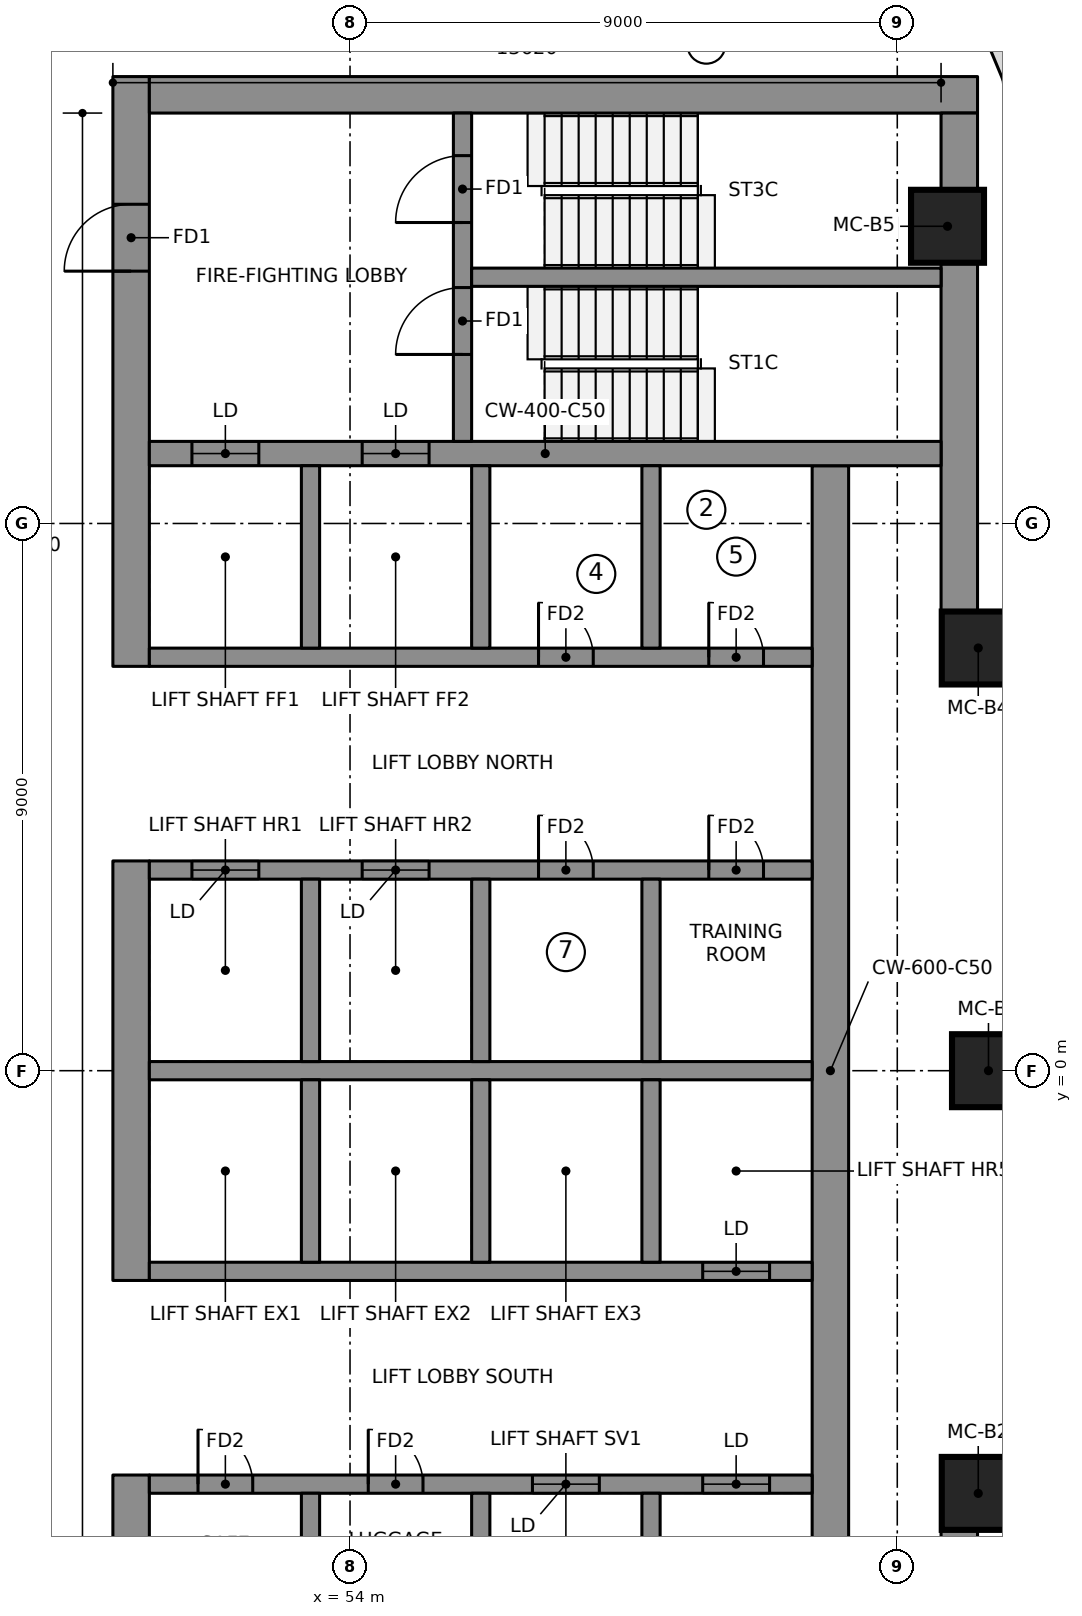
"""IFC4 building model, lengths in metres.
Left out: names, types, materials, properties, quantities, classifications, styles, units other than length and angle.
Written with IfcOpenShell. Run it as: python <this file> out.ifc"""

import sys

from ifc_helpers import new_model, si_unit, direction, frame, frame_2d, origin, origin_2d, place, context, subcontext, project, spatial, polyline, rectangle, outline, extrude, element, fill, save


model = new_model("IFC4")
c1 = context("Model", 3, precision=1e-05, world=origin(), true_north=direction((0.0, 1.0)))
c2 = subcontext(c1, "Body", "Model", "MODEL_VIEW")
j1 = project(units=[si_unit("LENGTHUNIT", "METRE"), si_unit("PLANEANGLEUNIT", "RADIAN")], contexts=[c1])
p1 = place(None, origin())
s1 = spatial("IfcSite", under=j1, at=p1, CompositionType="ELEMENT")
p2 = place(p1, origin())
s2 = spatial("IfcBuilding", under=s1, at=p2, CompositionType="ELEMENT")
p3 = place(p2, frame((0.0, 0.0, 227.9)))
s3 = spatial("IfcBuildingStorey", under=s2, at=p3, CompositionType="ELEMENT", Elevation=227.9)
p4 = place(p3, frame((50.4, 6.65, 0.0), z_axis=(0.0, 0.0, 1.0), x_axis=(0.0, 1.0, 0.0)))
e1 = element("IfcWall", 1, at=p4, inside=s3, PredefinedType="SHEAR", context=c2, shape_type="SweptSolid", body=[
    extrude(rectangle(XDim=9.7, YDim=0.6, at=frame_2d((4.85, 0.0))), origin(), (0.0, 0.0, 1.0), 3.55),
])
p5 = place(p4, frame((6.5, 0.0, 0.0)))
e2 = element("IfcOpeningElement", 2, at=p5, cuts=e1, PredefinedType="OPENING", context=c2, shape_type="SweptSolid", body=[
    extrude(rectangle(XDim=1.1, YDim=2.1, at=frame_2d((0.55, 1.05))), frame((0.0, 0.31, 0.0), z_axis=(0.0, -1.0, 0.0), x_axis=(1.0, 0.0, 0.0)), (0.0, 0.0, 1.0), 0.62),
])
p6 = place(p3, frame((50.4, -3.45, 0.0), z_axis=(0.0, 0.0, 1.0), x_axis=(0.0, 1.0, 0.0)))
e3 = element("IfcWall", 3, at=p6, inside=s3, PredefinedType="SHEAR", context=c2, shape_type="SweptSolid", body=[
    extrude(rectangle(XDim=6.9, YDim=0.6, at=frame_2d((3.45, 0.0))), origin(), (0.0, 0.0, 1.0), 3.55),
])
p7 = place(p3, frame((50.4, -16.35, 0.0), z_axis=(0.0, 0.0, 1.0), x_axis=(0.0, 1.0, 0.0)))
e4 = element("IfcWall", 4, at=p7, inside=s3, PredefinedType="SHEAR", context=c2, shape_type="SweptSolid", body=[
    extrude(rectangle(XDim=9.7, YDim=0.6, at=frame_2d((4.85, 0.0))), origin(), (0.0, 0.0, 1.0), 3.55),
])
p8 = place(p7, frame((2.1, 0.0, 0.0)))
e5 = element("IfcOpeningElement", 5, at=p8, cuts=e4, PredefinedType="OPENING", context=c2, shape_type="SweptSolid", body=[
    extrude(rectangle(XDim=1.1, YDim=2.1, at=frame_2d((0.55, 1.05))), frame((0.0, 0.31, 0.0), z_axis=(0.0, -1.0, 0.0), x_axis=(1.0, 0.0, 0.0)), (0.0, 0.0, 1.0), 0.62),
])
p9 = place(p3, frame((50.7, 16.05, 0.0), z_axis=(0.0, 0.0, 1.0), x_axis=(1.0, 0.0, 0.0)))
e6 = element("IfcWall", 6, at=p9, inside=s3, PredefinedType="SHEAR", context=c2, shape_type="SweptSolid", body=[
    extrude(rectangle(XDim=13.62, YDim=0.6, at=frame_2d((6.81, 0.0))), origin(), (0.0, 0.0, 1.0), 3.55),
])
for number, where, z_axis, x_axis in (
    (7, (64.02, 7.502, 0.0), (0.0, 0.0, 1.0), (0.0, 1.0, 0.0)),
    (8, (64.02, -15.75, 0.0), (0.0, 0.0, 1.0), (0.0, 1.0, 0.0)),
):
    element("IfcWall", number, at=place(p3, frame(where, z_axis=z_axis, x_axis=x_axis)), inside=s3, PredefinedType="SHEAR", context=c2, shape_type="SweptSolid", body=[
        extrude(rectangle(XDim=8.248, YDim=0.6, at=frame_2d((4.124, 0.0))), origin(), (0.0, 0.0, 1.0), 3.55),
    ])
p10 = place(p3, frame((61.9, -9.95, 0.0), z_axis=(0.0, 0.0, 1.0), x_axis=(0.0, 1.0, 0.0)))
e9 = element("IfcWall", 9, at=p10, inside=s3, PredefinedType="SHEAR", context=c2, shape_type="SweptSolid", body=[
    extrude(rectangle(XDim=19.9, YDim=0.6, at=frame_2d((9.95, 0.0))), origin(), (0.0, 0.0, 1.0), 3.55),
])
p11 = place(p3, frame((50.7, 10.15, 0.0), z_axis=(0.0, 0.0, 1.0), x_axis=(1.0, 0.0, 0.0)))
e10 = element("IfcWall", 10, at=p11, inside=s3, PredefinedType="SHEAR", context=c2, shape_type="SweptSolid", body=[
    extrude(rectangle(XDim=13.02, YDim=0.4, at=frame_2d((6.51, 0.0))), origin(), (0.0, 0.0, 1.0), 3.55),
])
p12 = place(p11, frame((0.7, 0.0, 0.0)))
e11 = element("IfcOpeningElement", 11, at=p12, cuts=e10, PredefinedType="OPENING", context=c2, shape_type="SweptSolid", body=[
    extrude(rectangle(XDim=1.1, YDim=2.1, at=frame_2d((0.55, 1.05))), frame((0.0, 0.21, 0.0), z_axis=(0.0, -1.0, 0.0), x_axis=(1.0, 0.0, 0.0)), (0.0, 0.0, 1.0), 0.42),
])
p13 = place(p11, frame((3.5, 0.0, 0.0)))
e12 = element("IfcOpeningElement", 12, at=p13, cuts=e10, PredefinedType="OPENING", context=c2, shape_type="SweptSolid", body=[
    extrude(rectangle(XDim=1.1, YDim=2.1, at=frame_2d((0.55, 1.05))), frame((0.0, 0.21, 0.0), z_axis=(0.0, -1.0, 0.0), x_axis=(1.0, 0.0, 0.0)), (0.0, 0.0, 1.0), 0.42),
])
p14 = place(p3, frame((50.7, 0.0, 0.0), z_axis=(0.0, 0.0, 1.0), x_axis=(1.0, 0.0, 0.0)))
e13 = element("IfcWall", 13, at=p14, inside=s3, PredefinedType="SHEAR", context=c2, shape_type="SweptSolid", body=[
    extrude(rectangle(XDim=10.9, YDim=0.3, at=frame_2d((5.45, 0.0))), origin(), (0.0, 0.0, 1.0), 3.55),
])
p15 = place(p3, frame((50.7, 3.3, 0.0), z_axis=(0.0, 0.0, 1.0), x_axis=(1.0, 0.0, 0.0)))
e14 = element("IfcWall", 14, at=p15, inside=s3, PredefinedType="SHEAR", context=c2, shape_type="SweptSolid", body=[
    extrude(rectangle(XDim=10.9, YDim=0.3, at=frame_2d((5.45, 0.0))), origin(), (0.0, 0.0, 1.0), 3.55),
])
p16 = place(p15, frame((0.7, 0.0, 0.0)))
e15 = element("IfcOpeningElement", 15, at=p16, cuts=e14, PredefinedType="OPENING", context=c2, shape_type="SweptSolid", body=[
    extrude(rectangle(XDim=1.1, YDim=2.1, at=frame_2d((0.55, 1.05))), frame((0.0, 0.16, 0.0), z_axis=(0.0, -1.0, 0.0), x_axis=(1.0, 0.0, 0.0)), (0.0, 0.0, 1.0), 0.32),
])
p17 = place(p15, frame((3.5, 0.0, 0.0)))
e16 = element("IfcOpeningElement", 16, at=p17, cuts=e14, PredefinedType="OPENING", context=c2, shape_type="SweptSolid", body=[
    extrude(rectangle(XDim=1.1, YDim=2.1, at=frame_2d((0.55, 1.05))), frame((0.0, 0.16, 0.0), z_axis=(0.0, -1.0, 0.0), x_axis=(1.0, 0.0, 0.0)), (0.0, 0.0, 1.0), 0.32),
])
p18 = place(p15, frame((6.4, 0.0, 0.0)))
e17 = element("IfcOpeningElement", 17, at=p18, cuts=e14, PredefinedType="OPENING", context=c2, shape_type="SweptSolid", body=[
    extrude(rectangle(XDim=0.9, YDim=2.1, at=frame_2d((0.45, 1.05))), frame((0.0, 0.16, 0.0), z_axis=(0.0, -1.0, 0.0), x_axis=(1.0, 0.0, 0.0)), (0.0, 0.0, 1.0), 0.32),
])
p19 = place(p15, frame((9.2, 0.0, 0.0)))
e18 = element("IfcOpeningElement", 18, at=p19, cuts=e14, PredefinedType="OPENING", context=c2, shape_type="SweptSolid", body=[
    extrude(rectangle(XDim=0.9, YDim=2.1, at=frame_2d((0.45, 1.05))), frame((0.0, 0.16, 0.0), z_axis=(0.0, -1.0, 0.0), x_axis=(1.0, 0.0, 0.0)), (0.0, 0.0, 1.0), 0.32),
])
p20 = place(p3, frame((50.7, 6.8, 0.0), z_axis=(0.0, 0.0, 1.0), x_axis=(1.0, 0.0, 0.0)))
e19 = element("IfcWall", 19, at=p20, inside=s3, PredefinedType="SHEAR", context=c2, shape_type="SweptSolid", body=[
    extrude(rectangle(XDim=10.9, YDim=0.3, at=frame_2d((5.45, 0.0))), origin(), (0.0, 0.0, 1.0), 3.55),
])
p21 = place(p20, frame((6.4, 0.0, 0.0)))
e20 = element("IfcOpeningElement", 20, at=p21, cuts=e19, PredefinedType="OPENING", context=c2, shape_type="SweptSolid", body=[
    extrude(rectangle(XDim=0.9, YDim=2.1, at=frame_2d((0.45, 1.05))), frame((0.0, 0.16, 0.0), z_axis=(0.0, -1.0, 0.0), x_axis=(1.0, 0.0, 0.0)), (0.0, 0.0, 1.0), 0.32),
])
p22 = place(p20, frame((9.2, 0.0, 0.0)))
e21 = element("IfcOpeningElement", 21, at=p22, cuts=e19, PredefinedType="OPENING", context=c2, shape_type="SweptSolid", body=[
    extrude(rectangle(XDim=0.9, YDim=2.1, at=frame_2d((0.45, 1.05))), frame((0.0, 0.16, 0.0), z_axis=(0.0, -1.0, 0.0), x_axis=(1.0, 0.0, 0.0)), (0.0, 0.0, 1.0), 0.32),
])
for number, where, z_axis, x_axis in (
    (22, (53.35, 0.15, 0.0), (0.0, 0.0, 1.0), (0.0, 1.0, 0.0)),
    (23, (53.35, 6.95, 0.0), (0.0, 0.0, 1.0), (0.0, 1.0, 0.0)),
    (24, (56.15, 0.15, 0.0), (0.0, 0.0, 1.0), (0.0, 1.0, 0.0)),
    (25, (56.15, 6.95, 0.0), (0.0, 0.0, 1.0), (0.0, 1.0, 0.0)),
    (26, (58.95, 0.15, 0.0), (0.0, 0.0, 1.0), (0.0, 1.0, 0.0)),
    (27, (58.95, 6.95, 0.0), (0.0, 0.0, 1.0), (0.0, 1.0, 0.0)),
):
    element("IfcWall", number, at=place(p3, frame(where, z_axis=z_axis, x_axis=x_axis)), inside=s3, PredefinedType="SHEAR", context=c2, shape_type="SweptSolid", body=[
        extrude(rectangle(XDim=3.0, YDim=0.3, at=frame_2d((1.5, 0.0))), origin(), (0.0, 0.0, 1.0), 3.55),
    ])
p23 = place(p3, frame((50.7, -3.3, 0.0), z_axis=(0.0, 0.0, 1.0), x_axis=(1.0, 0.0, 0.0)))
e28 = element("IfcWall", 28, at=p23, inside=s3, PredefinedType="SHEAR", context=c2, shape_type="SweptSolid", body=[
    extrude(rectangle(XDim=10.9, YDim=0.3, at=frame_2d((5.45, 0.0))), origin(), (0.0, 0.0, 1.0), 3.55),
])
p24 = place(p23, frame((9.1, 0.0, 0.0)))
e29 = element("IfcOpeningElement", 29, at=p24, cuts=e28, PredefinedType="OPENING", context=c2, shape_type="SweptSolid", body=[
    extrude(rectangle(XDim=1.1, YDim=2.1, at=frame_2d((0.55, 1.05))), frame((0.0, 0.16, 0.0), z_axis=(0.0, -1.0, 0.0), x_axis=(1.0, 0.0, 0.0)), (0.0, 0.0, 1.0), 0.32),
])
p25 = place(p3, frame((50.7, -6.8, 0.0), z_axis=(0.0, 0.0, 1.0), x_axis=(1.0, 0.0, 0.0)))
e30 = element("IfcWall", 30, at=p25, inside=s3, PredefinedType="SHEAR", context=c2, shape_type="SweptSolid", body=[
    extrude(rectangle(XDim=10.9, YDim=0.3, at=frame_2d((5.45, 0.0))), origin(), (0.0, 0.0, 1.0), 3.55),
])
p26 = place(p25, frame((6.3, 0.0, 0.0)))
e31 = element("IfcOpeningElement", 31, at=p26, cuts=e30, PredefinedType="OPENING", context=c2, shape_type="SweptSolid", body=[
    extrude(rectangle(XDim=1.1, YDim=2.1, at=frame_2d((0.55, 1.05))), frame((0.0, 0.16, 0.0), z_axis=(0.0, -1.0, 0.0), x_axis=(1.0, 0.0, 0.0)), (0.0, 0.0, 1.0), 0.32),
])
p27 = place(p25, frame((9.1, 0.0, 0.0)))
e32 = element("IfcOpeningElement", 32, at=p27, cuts=e30, PredefinedType="OPENING", context=c2, shape_type="SweptSolid", body=[
    extrude(rectangle(XDim=1.1, YDim=2.1, at=frame_2d((0.55, 1.05))), frame((0.0, 0.16, 0.0), z_axis=(0.0, -1.0, 0.0), x_axis=(1.0, 0.0, 0.0)), (0.0, 0.0, 1.0), 0.32),
])
p28 = place(p25, frame((0.8, 0.0, 0.0)))
e33 = element("IfcOpeningElement", 33, at=p28, cuts=e30, PredefinedType="OPENING", context=c2, shape_type="SweptSolid", body=[
    extrude(rectangle(XDim=0.9, YDim=2.1, at=frame_2d((0.45, 1.05))), frame((0.0, 0.16, 0.0), z_axis=(0.0, -1.0, 0.0), x_axis=(1.0, 0.0, 0.0)), (0.0, 0.0, 1.0), 0.32),
])
p29 = place(p25, frame((3.6, 0.0, 0.0)))
e34 = element("IfcOpeningElement", 34, at=p29, cuts=e30, PredefinedType="OPENING", context=c2, shape_type="SweptSolid", body=[
    extrude(rectangle(XDim=0.9, YDim=2.1, at=frame_2d((0.45, 1.05))), frame((0.0, 0.16, 0.0), z_axis=(0.0, -1.0, 0.0), x_axis=(1.0, 0.0, 0.0)), (0.0, 0.0, 1.0), 0.32),
])
for number, where, z_axis, x_axis in (
    (35, (53.35, -3.15, 0.0), (0.0, 0.0, 1.0), (0.0, 1.0, 0.0)),
    (36, (53.35, -9.95, 0.0), (0.0, 0.0, 1.0), (0.0, 1.0, 0.0)),
    (37, (56.15, -3.15, 0.0), (0.0, 0.0, 1.0), (0.0, 1.0, 0.0)),
    (38, (56.15, -9.95, 0.0), (0.0, 0.0, 1.0), (0.0, 1.0, 0.0)),
    (39, (58.95, -3.15, 0.0), (0.0, 0.0, 1.0), (0.0, 1.0, 0.0)),
    (40, (58.95, -9.95, 0.0), (0.0, 0.0, 1.0), (0.0, 1.0, 0.0)),
):
    element("IfcWall", number, at=place(p3, frame(where, z_axis=z_axis, x_axis=x_axis)), inside=s3, PredefinedType="SHEAR", context=c2, shape_type="SweptSolid", body=[
        extrude(rectangle(XDim=3.0, YDim=0.3, at=frame_2d((1.5, 0.0))), origin(), (0.0, 0.0, 1.0), 3.55),
    ])
p30 = place(p3, frame((55.85, 10.35, 0.0), z_axis=(0.0, 0.0, 1.0), x_axis=(0.0, 1.0, 0.0)))
e41 = element("IfcWall", 41, at=p30, inside=s3, PredefinedType="SHEAR", context=c2, shape_type="SweptSolid", body=[
    extrude(rectangle(XDim=5.4, YDim=0.3, at=frame_2d((2.7, 0.0))), origin(), (0.0, 0.0, 1.0), 3.55),
])
p31 = place(p30, frame((1.43, 0.0, 0.0)))
e42 = element("IfcOpeningElement", 42, at=p31, cuts=e41, PredefinedType="OPENING", context=c2, shape_type="SweptSolid", body=[
    extrude(rectangle(XDim=1.1, YDim=2.1, at=frame_2d((0.55, 1.05))), frame((0.0, 0.16, 0.0), z_axis=(0.0, -1.0, 0.0), x_axis=(1.0, 0.0, 0.0)), (0.0, 0.0, 1.0), 0.32),
])
p32 = place(p30, frame((3.6, 0.0, 0.0)))
e43 = element("IfcOpeningElement", 43, at=p32, cuts=e41, PredefinedType="OPENING", context=c2, shape_type="SweptSolid", body=[
    extrude(rectangle(XDim=1.1, YDim=2.1, at=frame_2d((0.55, 1.05))), frame((0.0, 0.16, 0.0), z_axis=(0.0, -1.0, 0.0), x_axis=(1.0, 0.0, 0.0)), (0.0, 0.0, 1.0), 0.32),
])
p33 = place(p3, frame((56.0, 13.05, 0.0), z_axis=(0.0, 0.0, 1.0), x_axis=(1.0, 0.0, 0.0)))
e44 = element("IfcWall", 44, at=p33, inside=s3, PredefinedType="SHEAR", context=c2, shape_type="SweptSolid", body=[
    extrude(rectangle(XDim=7.72, YDim=0.3, at=frame_2d((3.86, 0.0))), origin(), (0.0, 0.0, 1.0), 3.55),
])
for number, where, z_axis, x_axis in (
    (45, (64.332, -6.952, 0.0), (0.0, 0.0, 1.0), (1.0, 0.0, 0.0)),
    (46, (64.5, 0.0, 0.0), (0.0, 0.0, 1.0), (1.0, 0.0, 0.0)),
    (47, (64.332, 6.952, 0.0), (0.0, 0.0, 1.0), (1.0, 0.0, 0.0)),
    (48, (63.826, 13.888, 0.0), (0.0, 0.0, 1.0), (1.0, 0.0, 0.0)),
):
    element("IfcColumn", number, at=place(p3, frame(where, z_axis=z_axis, x_axis=x_axis)), inside=s3, PredefinedType="COLUMN", context=c2, shape_type="SweptSolid", body=[
        extrude(rectangle(XDim=1.2, YDim=1.2, at=origin_2d()), origin(), (0.0, 0.0, 1.0), 3.55),
    ])
p34 = place(p3, frame((64.938, 16.337, 0.0), z_axis=(0.0, 0.0, 1.0), x_axis=(-0.3844335483, 0.923152667191, 0.0)))
e49 = element("IfcWall", 49, at=p34, inside=s3, PredefinedType="NOTDEFINED", context=c2, shape_type="SweptSolid", body=[
    extrude(outline(polyline([(-0.03, -0.2), (3.871, -0.2), (3.756, 0.2), (0.03, 0.2), (-0.03, -0.2)])), origin(), (0.0, 0.0, 1.0), 3.25),
])
p35 = place(p34, frame((0.807, 0.0, 0.6)))
e50 = element("IfcOpeningElement", 50, at=p35, cuts=e49, PredefinedType="OPENING", context=c2, shape_type="SweptSolid", body=[
    extrude(outline(polyline([(0.0, 1.35), (0.084, 1.771), (0.322, 2.128), (0.679, 2.366), (1.1, 2.45), (1.521, 2.366), (1.878, 2.128), (2.116, 1.771), (2.2, 1.35), (2.2, 1.1), (2.116, 0.679), (1.878, 0.322), (1.521, 0.084), (1.1, 0.0), (0.679, 0.084), (0.322, 0.322), (0.084, 0.679), (0.0, 1.1), (0.0, 1.35)])), frame((0.0, 0.21, 0.0), z_axis=(0.0, -1.0, 0.0), x_axis=(1.0, 0.0, 0.0)), (0.0, 0.0, 1.0), 0.42),
])
p36 = place(p12, origin())
e51 = element("IfcDoor", 51, at=p36, inside=s3, OperationType="DOUBLE_DOOR_SLIDING", PredefinedType="DOOR", context=c2, shape_type="SweptSolid", body=[
    extrude(rectangle(XDim=1.1, YDim=2.1, at=frame_2d((0.55, 1.05))), frame((0.0, 0.025, 0.0), z_axis=(0.0, -1.0, 0.0), x_axis=(1.0, 0.0, 0.0)), (0.0, 0.0, 1.0), 0.05),
])
fill(e11, e51)
p37 = place(p13, origin())
e52 = element("IfcDoor", 52, at=p37, inside=s3, OperationType="DOUBLE_DOOR_SLIDING", PredefinedType="DOOR", context=c2, shape_type="SweptSolid", body=[
    extrude(rectangle(XDim=1.1, YDim=2.1, at=frame_2d((0.55, 1.05))), frame((0.0, 0.025, 0.0), z_axis=(0.0, -1.0, 0.0), x_axis=(1.0, 0.0, 0.0)), (0.0, 0.0, 1.0), 0.05),
])
fill(e12, e52)
p38 = place(p16, origin())
e53 = element("IfcDoor", 53, at=p38, inside=s3, OperationType="DOUBLE_DOOR_SLIDING", PredefinedType="DOOR", context=c2, shape_type="SweptSolid", body=[
    extrude(rectangle(XDim=1.1, YDim=2.1, at=frame_2d((0.55, 1.05))), frame((0.0, 0.025, 0.0), z_axis=(0.0, -1.0, 0.0), x_axis=(1.0, 0.0, 0.0)), (0.0, 0.0, 1.0), 0.05),
])
fill(e15, e53)
p39 = place(p17, origin())
e54 = element("IfcDoor", 54, at=p39, inside=s3, OperationType="DOUBLE_DOOR_SLIDING", PredefinedType="DOOR", context=c2, shape_type="SweptSolid", body=[
    extrude(rectangle(XDim=1.1, YDim=2.1, at=frame_2d((0.55, 1.05))), frame((0.0, 0.025, 0.0), z_axis=(0.0, -1.0, 0.0), x_axis=(1.0, 0.0, 0.0)), (0.0, 0.0, 1.0), 0.05),
])
fill(e16, e54)
p40 = place(p24, origin())
e55 = element("IfcDoor", 55, at=p40, inside=s3, OperationType="DOUBLE_DOOR_SLIDING", PredefinedType="DOOR", context=c2, shape_type="SweptSolid", body=[
    extrude(rectangle(XDim=1.1, YDim=2.1, at=frame_2d((0.55, 1.05))), frame((0.0, 0.025, 0.0), z_axis=(0.0, -1.0, 0.0), x_axis=(1.0, 0.0, 0.0)), (0.0, 0.0, 1.0), 0.05),
])
fill(e29, e55)
p41 = place(p26, origin())
e56 = element("IfcDoor", 56, at=p41, inside=s3, OperationType="DOUBLE_DOOR_SLIDING", PredefinedType="DOOR", context=c2, shape_type="SweptSolid", body=[
    extrude(rectangle(XDim=1.1, YDim=2.1, at=frame_2d((0.55, 1.05))), frame((0.0, 0.025, 0.0), z_axis=(0.0, -1.0, 0.0), x_axis=(1.0, 0.0, 0.0)), (0.0, 0.0, 1.0), 0.05),
])
fill(e31, e56)
p42 = place(p27, origin())
e57 = element("IfcDoor", 57, at=p42, inside=s3, OperationType="DOUBLE_DOOR_SLIDING", PredefinedType="DOOR", context=c2, shape_type="SweptSolid", body=[
    extrude(rectangle(XDim=1.1, YDim=2.1, at=frame_2d((0.55, 1.05))), frame((0.0, 0.025, 0.0), z_axis=(0.0, -1.0, 0.0), x_axis=(1.0, 0.0, 0.0)), (0.0, 0.0, 1.0), 0.05),
])
fill(e32, e57)
p43 = place(p31, origin())
e58 = element("IfcDoor", 58, at=p43, inside=s3, OperationType="SINGLE_SWING_RIGHT", PredefinedType="DOOR", context=c2, shape_type="SweptSolid", body=[
    extrude(rectangle(XDim=1.1, YDim=2.1, at=frame_2d((0.55, 1.05))), frame((0.0, 0.025, 0.0), z_axis=(0.0, -1.0, 0.0), x_axis=(1.0, 0.0, 0.0)), (0.0, 0.0, 1.0), 0.05),
])
fill(e42, e58)
p44 = place(p32, origin())
e59 = element("IfcDoor", 59, at=p44, inside=s3, OperationType="SINGLE_SWING_RIGHT", PredefinedType="DOOR", context=c2, shape_type="SweptSolid", body=[
    extrude(rectangle(XDim=1.1, YDim=2.1, at=frame_2d((0.55, 1.05))), frame((0.0, 0.025, 0.0), z_axis=(0.0, -1.0, 0.0), x_axis=(1.0, 0.0, 0.0)), (0.0, 0.0, 1.0), 0.05),
])
fill(e43, e59)
p45 = place(p5, origin())
e60 = element("IfcDoor", 60, at=p45, inside=s3, OperationType="SINGLE_SWING_RIGHT", PredefinedType="DOOR", context=c2, shape_type="SweptSolid", body=[
    extrude(rectangle(XDim=1.1, YDim=2.1, at=frame_2d((0.55, 1.05))), frame((0.0, 0.025, 0.0), z_axis=(0.0, -1.0, 0.0), x_axis=(1.0, 0.0, 0.0)), (0.0, 0.0, 1.0), 0.05),
])
fill(e2, e60)
p46 = place(p21, origin())
e61 = element("IfcDoor", 61, at=p46, inside=s3, OperationType="SINGLE_SWING_LEFT", PredefinedType="DOOR", context=c2, shape_type="SweptSolid", body=[
    extrude(rectangle(XDim=0.9, YDim=2.1, at=frame_2d((0.45, 1.05))), frame((0.0, 0.025, 0.0), z_axis=(0.0, -1.0, 0.0), x_axis=(1.0, 0.0, 0.0)), (0.0, 0.0, 1.0), 0.05),
])
fill(e20, e61)
p47 = place(p22, origin())
e62 = element("IfcDoor", 62, at=p47, inside=s3, OperationType="SINGLE_SWING_LEFT", PredefinedType="DOOR", context=c2, shape_type="SweptSolid", body=[
    extrude(rectangle(XDim=0.9, YDim=2.1, at=frame_2d((0.45, 1.05))), frame((0.0, 0.025, 0.0), z_axis=(0.0, -1.0, 0.0), x_axis=(1.0, 0.0, 0.0)), (0.0, 0.0, 1.0), 0.05),
])
fill(e21, e62)
p48 = place(p18, origin())
e63 = element("IfcDoor", 63, at=p48, inside=s3, OperationType="SINGLE_SWING_LEFT", PredefinedType="DOOR", context=c2, shape_type="SweptSolid", body=[
    extrude(rectangle(XDim=0.9, YDim=2.1, at=frame_2d((0.45, 1.05))), frame((0.0, 0.025, 0.0), z_axis=(0.0, -1.0, 0.0), x_axis=(1.0, 0.0, 0.0)), (0.0, 0.0, 1.0), 0.05),
])
fill(e17, e63)
p49 = place(p19, origin())
e64 = element("IfcDoor", 64, at=p49, inside=s3, OperationType="SINGLE_SWING_LEFT", PredefinedType="DOOR", context=c2, shape_type="SweptSolid", body=[
    extrude(rectangle(XDim=0.9, YDim=2.1, at=frame_2d((0.45, 1.05))), frame((0.0, 0.025, 0.0), z_axis=(0.0, -1.0, 0.0), x_axis=(1.0, 0.0, 0.0)), (0.0, 0.0, 1.0), 0.05),
])
fill(e18, e64)
p50 = place(p28, origin())
e65 = element("IfcDoor", 65, at=p50, inside=s3, OperationType="SINGLE_SWING_LEFT", PredefinedType="DOOR", context=c2, shape_type="SweptSolid", body=[
    extrude(rectangle(XDim=0.9, YDim=2.1, at=frame_2d((0.45, 1.05))), frame((0.0, 0.025, 0.0), z_axis=(0.0, -1.0, 0.0), x_axis=(1.0, 0.0, 0.0)), (0.0, 0.0, 1.0), 0.05),
])
fill(e33, e65)
p51 = place(p29, origin())
e66 = element("IfcDoor", 66, at=p51, inside=s3, OperationType="SINGLE_SWING_LEFT", PredefinedType="DOOR", context=c2, shape_type="SweptSolid", body=[
    extrude(rectangle(XDim=0.9, YDim=2.1, at=frame_2d((0.45, 1.05))), frame((0.0, 0.025, 0.0), z_axis=(0.0, -1.0, 0.0), x_axis=(1.0, 0.0, 0.0)), (0.0, 0.0, 1.0), 0.05),
])
fill(e34, e66)
save(model, sys.argv[1])
